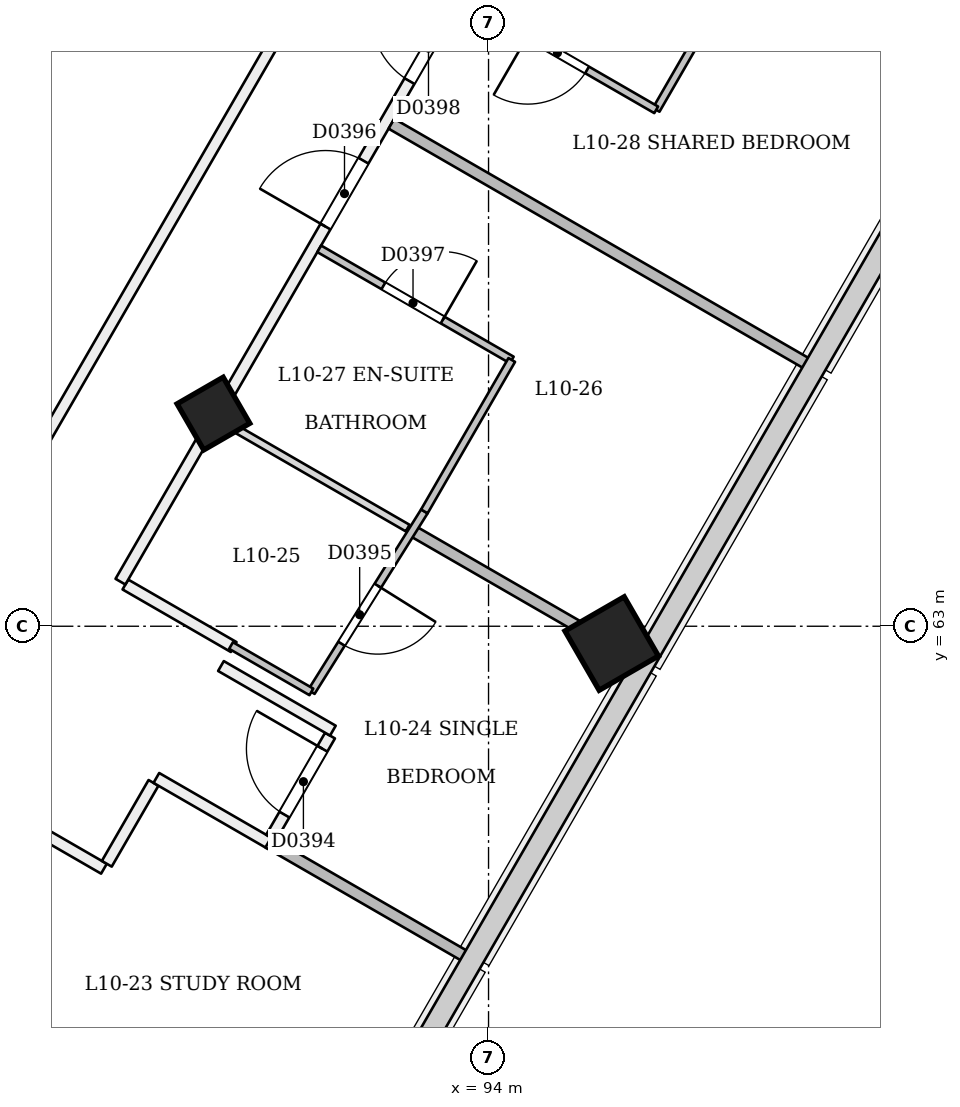
"""IFC4 building model, lengths in metres.
Left out: names, types, materials, properties, quantities, classifications, styles, units other than length and angle.
Written with IfcOpenShell. Run it as: python <this file> out.ifc"""

import sys

from ifc_helpers import new_model, si_unit, direction, frame, frame_2d, origin, origin_2d, place, context, subcontext, project, spatial, rectangle, extrude, element, fill, save


model = new_model("IFC4")
c1 = context("Model", 3, precision=1e-05, world=origin(), true_north=direction((0.0, 1.0)))
c2 = subcontext(c1, "Body", "Model", "MODEL_VIEW")
j1 = project(units=[si_unit("LENGTHUNIT", "METRE"), si_unit("PLANEANGLEUNIT", "RADIAN")], contexts=[c1])
p1 = place(None, origin())
s1 = spatial("IfcSite", under=j1, at=p1, CompositionType="ELEMENT")
p2 = place(p1, origin())
s2 = spatial("IfcBuilding", under=s1, at=p2, CompositionType="ELEMENT")
p3 = place(p2, frame((0.0, 0.0, 45.0)))
s3 = spatial("IfcBuildingStorey", under=s2, at=p3, CompositionType="ELEMENT", Elevation=45.0)
p4 = place(p3, frame((90.408, 65.75, -0.021), z_axis=(-0.02222134892, 0.038480872521, 0.999012229206), x_axis=(-0.500177267103, -0.865637955049, 0.022217836353)))
e1 = element("IfcColumn", 1, at=p4, inside=s3, PredefinedType="COLUMN", context=c2, shape_type="SweptSolid", body=[
    extrude(rectangle(XDim=0.7, YDim=0.7, at=origin_2d()), origin(), (0.0, 0.0, 1.0), 3.604),
])
p5 = place(p3, frame((95.647, 62.725, -0.027), z_axis=(-0.022221406801, 0.038413224561, 0.999014831351), x_axis=(-0.499515616198, -0.866020679134, 0.022188566591)))
e2 = element("IfcColumn", 2, at=p5, inside=s3, PredefinedType="COLUMN", context=c2, shape_type="SweptSolid", body=[
    extrude(rectangle(XDim=0.9, YDim=0.9, at=origin_2d()), origin(), (0.0, 0.0, 1.0), 3.604),
])
p6 = place(p3, frame((87.533, 60.623, 0.0), z_axis=(0.0, 0.0, 1.0), x_axis=(0.866015446554, -0.500017246033, 0.0)))
e3 = element("IfcWall", 3, at=p6, inside=s3, PredefinedType="PARTITIONING", context=c2, shape_type="SweptSolid", body=[
    extrude(rectangle(XDim=1.625, YDim=0.15, at=frame_2d((0.812, 0.0))), origin(), (0.0, 0.0, 1.0), 3.1),
])
p7 = place(p3, frame((88.978, 59.875, 0.0), z_axis=(0.0, 0.0, 1.0), x_axis=(0.500049196018, 0.865996998587, 0.0)))
e4 = element("IfcWall", 4, at=p7, inside=s3, PredefinedType="PARTITIONING", context=c2, shape_type="SweptSolid", body=[
    extrude(rectangle(XDim=1.229, YDim=0.15, at=frame_2d((0.615, 0.0))), origin(), (0.0, 0.0, 1.0), 3.1),
])
p8 = place(p3, frame((89.63, 61.004, 0.0), z_axis=(0.0, 0.0, 1.0), x_axis=(0.866050849587, -0.499955923987, 0.0)))
e5 = element("IfcWall", 5, at=p8, inside=s3, PredefinedType="PARTITIONING", context=c2, shape_type="SweptSolid", body=[
    extrude(rectangle(XDim=1.72, YDim=0.15, at=frame_2d((0.86, 0.0))), origin(), (0.0, 0.0, 1.0), 3.1),
])
p9 = place(p3, frame((91.139, 60.219, 0.0), z_axis=(0.0, 0.0, 1.0), x_axis=(0.499967891604, 0.866043940782, 0.0)))
e6 = element("IfcWall", 6, at=p9, inside=s3, PredefinedType="PARTITIONING", context=c2, shape_type="SweptSolid", body=[
    extrude(rectangle(XDim=1.55, YDim=0.15, at=frame_2d((0.775, 0.0))), origin(), (0.0, 0.0, 1.0), 3.1),
])
p10 = place(p9, frame((0.35, 0.0, 0.0)))
e7 = element("IfcOpeningElement", 7, at=p10, cuts=e6, PredefinedType="OPENING", context=c2, shape_type="SweptSolid", body=[
    extrude(rectangle(XDim=1.0, YDim=2.1, at=frame_2d((0.5, 1.05))), frame((0.0, 0.085, 0.0), z_axis=(0.0, -1.0, 0.0), x_axis=(1.0, 0.0, 0.0)), (0.0, 0.0, 1.0), 0.171),
])
p11 = place(p3, frame((91.952, 61.626, 0.0), z_axis=(0.0, 0.0, 1.0), x_axis=(-0.865989465428, 0.500062241894, 0.0)))
e8 = element("IfcWall", 8, at=p11, inside=s3, PredefinedType="PARTITIONING", context=c2, shape_type="SweptSolid", body=[
    extrude(rectangle(XDim=1.7, YDim=0.15, at=frame_2d((0.85, 0.0))), origin(), (0.0, 0.0, 1.0), 3.1),
])
p12 = place(p3, frame((90.647, 62.726, 0.0), z_axis=(0.0, 0.0, 1.0), x_axis=(-0.866015045157, 0.50001794124, 0.0)))
e9 = element("IfcWall", 9, at=p12, inside=s3, PredefinedType="PARTITIONING", context=c2, shape_type="SweptSolid", body=[
    extrude(rectangle(XDim=1.645, YDim=0.15, at=frame_2d((0.823, 0.0))), origin(), (0.0, 0.0, 1.0), 3.1),
])
p13 = place(p3, frame((89.157, 63.586, 0.0), z_axis=(0.0, 0.0, 1.0), x_axis=(0.500000960059, 0.866024849493, 0.0)))
e10 = element("IfcWall", 10, at=p13, inside=s3, PredefinedType="PARTITIONING", context=c2, shape_type="SweptSolid", body=[
    extrude(rectangle(XDim=36.6, YDim=0.15, at=frame_2d((18.3, 0.0))), origin(), (0.0, 0.0, 1.0), 2.7),
])
p14 = place(p13, frame((5.395, 0.0, 0.0)))
e11 = element("IfcOpeningElement", 11, at=p14, cuts=e10, PredefinedType="OPENING", context=c2, shape_type="SweptSolid", body=[
    extrude(rectangle(XDim=1.0, YDim=2.1, at=frame_2d((0.5, 1.05))), frame((0.0, 0.085, 0.0), z_axis=(0.0, -1.0, 0.0), x_axis=(1.0, 0.0, 0.0)), (0.0, 0.0, 1.0), 0.171),
])
p15 = place(p13, frame((7.605, 0.0, 0.0)))
e12 = element("IfcOpeningElement", 12, at=p15, cuts=e10, PredefinedType="OPENING", context=c2, shape_type="SweptSolid", body=[
    extrude(rectangle(XDim=1.0, YDim=2.1, at=frame_2d((0.5, 1.05))), frame((0.0, 0.085, 0.0), z_axis=(0.0, -1.0, 0.0), x_axis=(1.0, 0.0, 0.0)), (0.0, 0.0, 1.0), 0.171),
])
p16 = place(p13, frame((13.25, 0.0, 0.0)))
e13 = element("IfcOpeningElement", 13, at=p16, cuts=e10, PredefinedType="OPENING", context=c2, shape_type="SweptSolid", body=[
    extrude(rectangle(XDim=1.0, YDim=2.1, at=frame_2d((0.5, 1.05))), frame((0.0, 0.085, 0.0), z_axis=(0.0, -1.0, 0.0), x_axis=(1.0, 0.0, 0.0)), (0.0, 0.0, 1.0), 0.171),
])
p17 = place(p13, frame((16.605, 0.0, 0.0)))
e14 = element("IfcOpeningElement", 14, at=p17, cuts=e10, PredefinedType="OPENING", context=c2, shape_type="SweptSolid", body=[
    extrude(rectangle(XDim=1.0, YDim=2.1, at=frame_2d((0.5, 1.05))), frame((0.0, 0.085, 0.0), z_axis=(0.0, -1.0, 0.0), x_axis=(1.0, 0.0, 0.0)), (0.0, 0.0, 1.0), 0.171),
])
p18 = place(p13, frame((23.395, 0.0, 0.0)))
e15 = element("IfcOpeningElement", 15, at=p18, cuts=e10, PredefinedType="OPENING", context=c2, shape_type="SweptSolid", body=[
    extrude(rectangle(XDim=1.0, YDim=2.1, at=frame_2d((0.5, 1.05))), frame((0.0, 0.085, 0.0), z_axis=(0.0, -1.0, 0.0), x_axis=(1.0, 0.0, 0.0)), (0.0, 0.0, 1.0), 0.171),
])
p19 = place(p13, frame((27.8, 0.0, 0.0)))
e16 = element("IfcOpeningElement", 16, at=p19, cuts=e10, PredefinedType="OPENING", context=c2, shape_type="SweptSolid", body=[
    extrude(rectangle(XDim=1.2, YDim=2.1, at=frame_2d((0.6, 1.05))), frame((0.0, 0.085, 0.0), z_axis=(0.0, -1.0, 0.0), x_axis=(1.0, 0.0, 0.0)), (0.0, 0.0, 1.0), 0.171),
])
p20 = place(p13, frame((35.36, 0.0, 0.0)))
e17 = element("IfcOpeningElement", 17, at=p20, cuts=e10, PredefinedType="OPENING", context=c2, shape_type="SweptSolid", body=[
    extrude(rectangle(XDim=1.0, YDim=2.1, at=frame_2d((0.5, 1.05))), frame((0.0, 0.085, 0.0), z_axis=(0.0, -1.0, 0.0), x_axis=(1.0, 0.0, 0.0)), (0.0, 0.0, 1.0), 0.171),
])
p21 = place(p3, frame((102.675, 90.6, 0.0), z_axis=(0.0, 0.0, 1.0), x_axis=(-0.499997865474, -0.86602663615, 0.0)))
e18 = element("IfcWall", 18, at=p21, inside=s3, PredefinedType="PARTITIONING", context=c2, shape_type="SweptSolid", body=[
    extrude(rectangle(XDim=35.221, YDim=0.15, at=frame_2d((17.61, 0.0))), origin(), (0.0, 0.0, 1.0), 3.1),
])
p22 = place(p21, frame((12.875, 0.0, 0.0)))
e19 = element("IfcOpeningElement", 19, at=p22, cuts=e18, PredefinedType="OPENING", context=c2, shape_type="SweptSolid", body=[
    extrude(rectangle(XDim=1.2, YDim=2.1, at=frame_2d((0.6, 1.05))), frame((0.0, 0.085, 0.0), z_axis=(0.0, -1.0, 0.0), x_axis=(1.0, 0.0, 0.0)), (0.0, 0.0, 1.0), 0.171),
])
p23 = place(p21, frame((4.983, 0.0, 0.0)))
e20 = element("IfcOpeningElement", 20, at=p23, cuts=e18, PredefinedType="OPENING", context=c2, shape_type="SweptSolid", body=[
    extrude(rectangle(XDim=1.2, YDim=2.1, at=frame_2d((0.6, 1.05))), frame((0.0, 0.085, 0.0), z_axis=(0.0, -1.0, 0.0), x_axis=(1.0, 0.0, 0.0)), (0.0, 0.0, 1.0), 0.171),
])
p24 = place(p21, frame((21.048, 0.0, 0.0)))
e21 = element("IfcOpeningElement", 21, at=p24, cuts=e18, PredefinedType="OPENING", context=c2, shape_type="SweptSolid", body=[
    extrude(rectangle(XDim=1.0, YDim=2.1, at=frame_2d((0.5, 1.05))), frame((0.0, 0.085, 0.0), z_axis=(0.0, -1.0, 0.0), x_axis=(1.0, 0.0, 0.0)), (0.0, 0.0, 1.0), 0.171),
])
p25 = place(p3, frame((91.728, 55.198, 0.0), z_axis=(0.0, 0.0, 1.0), x_axis=(-0.866018406147, 0.500012120068, 0.0)))
e22 = element("IfcWall", 22, at=p25, inside=s3, PredefinedType="PARTITIONING", context=c2, shape_type="SweptSolid", body=[
    extrude(rectangle(XDim=6.42, YDim=0.15, at=frame_2d((3.21, 0.0))), origin(), (0.0, 0.0, 1.0), 2.6),
])
p26 = place(p3, frame((93.718, 58.644, 0.0), z_axis=(0.0, 0.0, 1.0), x_axis=(-0.866050981532, 0.499955695424, 0.0)))
e23 = element("IfcWall", 23, at=p26, inside=s3, PredefinedType="PARTITIONING", context=c2, shape_type="SweptSolid", body=[
    extrude(rectangle(XDim=3.02, YDim=0.15, at=frame_2d((1.51, 0.0))), origin(), (0.0, 0.0, 1.0), 2.6),
])
p27 = place(p3, frame((93.156, 64.511, 0.0), z_axis=(0.0, 0.0, 1.0), x_axis=(-0.530562750291, -0.847645661821, 0.0)))
e24 = element("IfcWall", 24, at=p27, inside=s3, PredefinedType="PARTITIONING", context=c2, shape_type="SweptSolid", body=[
    extrude(rectangle(XDim=2.802, YDim=0.1, at=frame_2d((1.401, 0.0))), origin(), (0.0, 0.0, 1.0), 2.7),
])
p28 = place(p27, frame((1.154, 0.0, 0.0)))
e25 = element("IfcOpeningElement", 25, at=p28, cuts=e24, PredefinedType="OPENING", context=c2, shape_type="SweptSolid", body=[
    extrude(rectangle(XDim=0.9, YDim=2.1, at=frame_2d((0.45, 1.05))), frame((0.0, 0.061, 0.0), z_axis=(0.0, -1.0, 0.0), x_axis=(1.0, 0.0, 0.0)), (0.0, 0.0, 1.0), 0.121),
])
p29 = place(p3, frame((91.669, 62.136, 0.0), z_axis=(0.0, 0.0, 1.0), x_axis=(-0.866005645448, 0.500034220881, 0.0)))
e26 = element("IfcWall", 26, at=p29, inside=s3, PredefinedType="PARTITIONING", context=c2, shape_type="SweptSolid", body=[
    extrude(rectangle(XDim=1.22, YDim=0.1, at=frame_2d((0.61, 0.0))), origin(), (0.0, 0.0, 1.0), 3.1),
])
p30 = place(p3, frame((95.95, 62.551, 0.0), z_axis=(0.0, 0.0, 1.0), x_axis=(-0.865989465428, 0.500062241894, 0.0)))
e27 = element("IfcWall", 27, at=p30, inside=s3, PredefinedType="PARTITIONING", context=c2, shape_type="SweptSolid", body=[
    extrude(rectangle(XDim=3.4, YDim=0.15, at=frame_2d((1.7, 0.0))), origin(), (0.0, 0.0, 1.0), 2.6),
])
p31 = place(p3, frame((92.936, 64.292, 0.0), z_axis=(0.0, 0.0, 1.0), x_axis=(-0.866048401274, 0.499960165064, 0.0)))
e28 = element("IfcWall", 28, at=p31, inside=s3, PredefinedType="PARTITIONING", context=c2, shape_type="SweptSolid", body=[
    extrude(rectangle(XDim=2.845, YDim=0.1, at=frame_2d((1.422, 0.0))), origin(), (0.0, 0.0, 1.0), 2.7),
])
p32 = place(p3, frame((91.772, 67.966, 0.0), z_axis=(0.0, 0.0, 1.0), x_axis=(0.866025730634, -0.499999433879, 0.0)))
e29 = element("IfcWall", 29, at=p32, inside=s3, PredefinedType="PARTITIONING", context=c2, shape_type="SweptSolid", body=[
    extrude(rectangle(XDim=2.925, YDim=0.1, at=frame_2d((1.462, 0.0))), origin(), (0.0, 0.0, 1.0), 3.1),
])
p33 = place(p32, frame((0.975, 0.0, 0.0)))
e30 = element("IfcOpeningElement", 30, at=p33, cuts=e29, PredefinedType="OPENING", context=c2, shape_type="SweptSolid", body=[
    extrude(rectangle(XDim=0.9, YDim=2.1, at=frame_2d((0.45, 1.05))), frame((0.0, 0.061, 0.0), z_axis=(0.0, -1.0, 0.0), x_axis=(1.0, 0.0, 0.0)), (0.0, 0.0, 1.0), 0.121),
])
p34 = place(p3, frame((94.305, 66.503, 0.0), z_axis=(0.0, 0.0, 1.0), x_axis=(-0.499952165731, -0.866053019151, 0.0)))
e31 = element("IfcWall", 31, at=p34, inside=s3, PredefinedType="PARTITIONING", context=c2, shape_type="SweptSolid", body=[
    extrude(rectangle(XDim=2.3, YDim=0.1, at=frame_2d((1.15, 0.0))), origin(), (0.0, 0.0, 1.0), 3.1),
])
p35 = place(p3, frame((98.218, 66.438, 0.0), z_axis=(0.0, 0.0, 1.0), x_axis=(-0.866025401434, 0.500000004071, 0.0)))
e32 = element("IfcWall", 32, at=p35, inside=s3, PredefinedType="PARTITIONING", context=c2, shape_type="SweptSolid", body=[
    extrude(rectangle(XDim=6.345, YDim=0.15, at=frame_2d((3.173, 0.0))), origin(), (0.0, 0.0, 1.0), 2.6),
])
p36 = place(p3, frame((97.48, 72.002, 0.0), z_axis=(0.0, 0.0, 1.0), x_axis=(-0.499990435942, -0.866030925526, 0.0)))
e33 = element("IfcWall", 33, at=p36, inside=s3, PredefinedType="PARTITIONING", context=c2, shape_type="SweptSolid", body=[
    extrude(rectangle(XDim=2.55, YDim=0.1, at=frame_2d((1.275, 0.0))), origin(), (0.0, 0.0, 1.0), 2.7),
])
p37 = place(p3, frame((96.206, 69.794, 0.0), z_axis=(0.0, 0.0, 1.0), x_axis=(-0.866046596414, 0.499963291492, 0.0)))
e34 = element("IfcWall", 34, at=p37, inside=s3, PredefinedType="PARTITIONING", context=c2, shape_type="SweptSolid", body=[
    extrude(rectangle(XDim=2.925, YDim=0.1, at=frame_2d((1.462, 0.0))), origin(), (0.0, 0.0, 1.0), 3.1),
])
p38 = place(p37, frame((1.05, 0.0, 0.0)))
e35 = element("IfcOpeningElement", 35, at=p38, cuts=e34, PredefinedType="OPENING", context=c2, shape_type="SweptSolid", body=[
    extrude(rectangle(XDim=0.9, YDim=2.1, at=frame_2d((0.45, 1.05))), frame((0.0, 0.061, 0.0), z_axis=(0.0, -1.0, 0.0), x_axis=(1.0, 0.0, 0.0)), (0.0, 0.0, 1.0), 0.121),
])
p39 = place(p3, frame((100.45, 70.346, 0.0), z_axis=(0.0, 0.0, 1.0), x_axis=(-0.866032601554, 0.49998753289, 0.0)))
e36 = element("IfcWall", 36, at=p39, inside=s3, PredefinedType="PARTITIONING", context=c2, shape_type="SweptSolid", body=[
    extrude(rectangle(XDim=6.325, YDim=0.1, at=frame_2d((3.163, 0.0))), origin(), (0.0, 0.0, 1.0), 2.6),
])
p40 = place(p10, origin())
e37 = element("IfcDoor", 37, at=p40, inside=s3, OperationType="SINGLE_SWING_RIGHT", PredefinedType="NOTDEFINED", context=c2, shape_type="SweptSolid", body=[
    extrude(rectangle(XDim=1.0, YDim=2.1, at=frame_2d((0.5, 1.05))), frame((0.0, 0.025, 0.0), z_axis=(0.0, -1.0, 0.0), x_axis=(1.0, 0.0, 0.0)), (0.0, 0.0, 1.0), 0.05),
])
fill(e7, e37)
p41 = place(p28, origin())
e38 = element("IfcDoor", 38, at=p41, inside=s3, OperationType="SINGLE_SWING_LEFT", PredefinedType="NOTDEFINED", context=c2, shape_type="SweptSolid", body=[
    extrude(rectangle(XDim=0.9, YDim=2.1, at=frame_2d((0.45, 1.05))), frame((0.0, 0.025, 0.0), z_axis=(0.0, -1.0, 0.0), x_axis=(1.0, 0.0, 0.0)), (0.0, 0.0, 1.0), 0.05),
])
fill(e25, e38)
p42 = place(p14, origin())
e39 = element("IfcDoor", 39, at=p42, inside=s3, OperationType="SINGLE_SWING_LEFT", PredefinedType="NOTDEFINED", context=c2, shape_type="SweptSolid", body=[
    extrude(rectangle(XDim=1.0, YDim=2.1, at=frame_2d((0.5, 1.05))), frame((0.0, 0.025, 0.0), z_axis=(0.0, -1.0, 0.0), x_axis=(1.0, 0.0, 0.0)), (0.0, 0.0, 1.0), 0.05),
])
fill(e11, e39)
p43 = place(p33, origin())
e40 = element("IfcDoor", 40, at=p43, inside=s3, OperationType="SINGLE_SWING_RIGHT", PredefinedType="NOTDEFINED", context=c2, shape_type="SweptSolid", body=[
    extrude(rectangle(XDim=0.9, YDim=2.1, at=frame_2d((0.45, 1.05))), frame((0.0, 0.025, 0.0), z_axis=(0.0, -1.0, 0.0), x_axis=(1.0, 0.0, 0.0)), (0.0, 0.0, 1.0), 0.05),
])
fill(e30, e40)
p44 = place(p15, origin())
e41 = element("IfcDoor", 41, at=p44, inside=s3, OperationType="SINGLE_SWING_RIGHT", PredefinedType="NOTDEFINED", context=c2, shape_type="SweptSolid", body=[
    extrude(rectangle(XDim=1.0, YDim=2.1, at=frame_2d((0.5, 1.05))), frame((0.0, 0.025, 0.0), z_axis=(0.0, -1.0, 0.0), x_axis=(1.0, 0.0, 0.0)), (0.0, 0.0, 1.0), 0.05),
])
fill(e12, e41)
p45 = place(p38, origin())
e42 = element("IfcDoor", 42, at=p45, inside=s3, OperationType="SINGLE_SWING_RIGHT", PredefinedType="NOTDEFINED", context=c2, shape_type="SweptSolid", body=[
    extrude(rectangle(XDim=0.9, YDim=2.1, at=frame_2d((0.45, 1.05))), frame((0.0, 0.025, 0.0), z_axis=(0.0, -1.0, 0.0), x_axis=(1.0, 0.0, 0.0)), (0.0, 0.0, 1.0), 0.05),
])
fill(e35, e42)
save(model, sys.argv[1])
